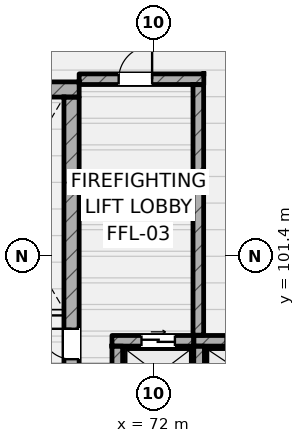
"""IFC4 building model, lengths in metres.
Left out: names, types, materials, properties, quantities, classifications, styles, units other than length and angle.
Written with IfcOpenShell. Run it as: python <this file> out.ifc"""

import sys

from ifc_helpers import new_model, si_unit, direction, frame, frame_2d, origin, place, context, subcontext, project, spatial, rectangle, extrude, element, fill, save


model = new_model("IFC4")
c1 = context("Model", 3, precision=1e-05, world=origin(), true_north=direction((0.0, 1.0)))
c2 = subcontext(c1, "Body", "Model", "MODEL_VIEW")
j1 = project(units=[si_unit("LENGTHUNIT", "METRE"), si_unit("PLANEANGLEUNIT", "RADIAN")], contexts=[c1])
p1 = place(None, origin())
s1 = spatial("IfcSite", under=j1, at=p1, CompositionType="ELEMENT")
p2 = place(p1, origin())
s2 = spatial("IfcBuilding", under=s1, at=p2, CompositionType="ELEMENT")
p3 = place(p2, frame((0.0, 0.0, 51.6)))
s3 = spatial("IfcBuildingStorey", under=s2, at=p3, CompositionType="ELEMENT", Elevation=51.6)
p4 = place(p3, frame((64.4, 106.862, 0.0), z_axis=(0.0, 0.0, 1.0), x_axis=(1.0, 0.0, 0.0)))
e1 = element("IfcWall", 1, at=p4, inside=s3, PredefinedType="SHEAR", context=c2, shape_type="SweptSolid", body=[
    extrude(rectangle(XDim=5.16, YDim=0.5, at=frame_2d((2.58, 0.0))), origin(), (0.0, 0.0, 1.0), 2.8),
])
p5 = place(p3, frame((69.31, 97.5, 0.0), z_axis=(0.0, 0.0, 1.0), x_axis=(0.0, 1.0, 0.0)))
e2 = element("IfcWall", 2, at=p5, inside=s3, PredefinedType="SHEAR", context=c2, shape_type="SweptSolid", body=[
    extrude(rectangle(XDim=9.112, YDim=0.5, at=frame_2d((4.556, 0.0))), origin(), (0.0, 0.0, 1.0), 2.8),
])
p6 = place(p5, frame((0.49, 0.0, 0.0)))
e3 = element("IfcOpeningElement", 3, at=p6, cuts=e2, PredefinedType="OPENING", context=c2, shape_type="SweptSolid", body=[
    extrude(rectangle(XDim=1.0, YDim=2.15, at=frame_2d((0.5, 1.075))), frame((0.0, 0.26, 0.0), z_axis=(0.0, -1.0, 0.0), x_axis=(1.0, 0.0, 0.0)), (0.0, 0.0, 1.0), 0.52),
])
p7 = place(p3, frame((70.64, 98.595, 0.0), z_axis=(0.0, 0.0, 1.0), x_axis=(1.0, 0.0, 0.0)))
e4 = element("IfcWall", 4, at=p7, inside=s3, PredefinedType="SHEAR", context=c2, shape_type="SweptSolid", body=[
    extrude(rectangle(XDim=2.69, YDim=0.35, at=frame_2d((1.345, 0.0))), origin(), (0.0, 0.0, 1.0), 3.6),
])
p8 = place(p7, frame((0.97, 0.0, 0.0)))
e5 = element("IfcOpeningElement", 5, at=p8, cuts=e4, PredefinedType="OPENING", context=c2, shape_type="SweptSolid", body=[
    extrude(rectangle(XDim=1.1, YDim=2.2, at=frame_2d((0.55, 1.1))), frame((0.0, 0.185, 0.0), z_axis=(0.0, -1.0, 0.0), x_axis=(1.0, 0.0, 0.0)), (0.0, 0.0, 1.0), 0.37),
])
p9 = place(p3, frame((70.815, 96.58, 0.0), z_axis=(0.0, 0.0, 1.0), x_axis=(0.0, 1.0, 0.0)))
e6 = element("IfcWall", 6, at=p9, inside=s3, PredefinedType="SHEAR", context=c2, shape_type="SweptSolid", body=[
    extrude(rectangle(XDim=1.84, YDim=0.35, at=frame_2d((0.92, 0.0))), origin(), (0.0, 0.0, 1.0), 3.6),
])
p10 = place(p3, frame((73.33, 98.595, 0.0), z_axis=(0.0, 0.0, 1.0), x_axis=(1.0, 0.0, 0.0)))
e7 = element("IfcWall", 7, at=p10, inside=s3, PredefinedType="SHEAR", context=c2, shape_type="SweptSolid", body=[
    extrude(rectangle(XDim=3.34, YDim=0.35, at=frame_2d((1.67, 0.0))), origin(), (0.0, 0.0, 1.0), 3.6),
])
p11 = place(p10, frame((1.045, 0.0, 0.0)))
e8 = element("IfcOpeningElement", 8, at=p11, cuts=e7, PredefinedType="OPENING", context=c2, shape_type="SweptSolid", body=[
    extrude(rectangle(XDim=1.25, YDim=2.25, at=frame_2d((0.625, 1.125))), frame((0.0, 0.185, 0.0), z_axis=(0.0, -1.0, 0.0), x_axis=(1.0, 0.0, 0.0)), (0.0, 0.0, 1.0), 0.37),
])
p12 = place(p3, frame((73.505, 96.58, 0.0), z_axis=(0.0, 0.0, 1.0), x_axis=(0.0, 1.0, 0.0)))
e9 = element("IfcWall", 9, at=p12, inside=s3, PredefinedType="SHEAR", context=c2, shape_type="SweptSolid", body=[
    extrude(rectangle(XDim=1.84, YDim=0.35, at=frame_2d((0.92, 0.0))), origin(), (0.0, 0.0, 1.0), 3.6),
])
p13 = place(p3, frame((73.48, 98.78, 0.0), z_axis=(0.0, 0.0, 1.0), x_axis=(0.0, 1.0, 0.0)))
e10 = element("IfcWall", 10, at=p13, inside=s3, PredefinedType="SHEAR", context=c2, shape_type="SweptSolid", body=[
    extrude(rectangle(XDim=8.24, YDim=0.35, at=frame_2d((4.12, 0.0))), origin(), (0.0, 0.0, 1.0), 2.6),
])
p14 = place(p3, frame((69.56, 107.2, 0.0), z_axis=(0.0, 0.0, 1.0), x_axis=(1.0, 0.0, 0.0)))
e11 = element("IfcWall", 11, at=p14, inside=s3, PredefinedType="SHEAR", context=c2, shape_type="SweptSolid", body=[
    extrude(rectangle(XDim=4.1, YDim=0.35, at=frame_2d((2.05, 0.0))), origin(), (0.0, 0.0, 1.0), 2.6),
])
p15 = place(p14, frame((1.3, 0.0, 0.0)))
e12 = element("IfcOpeningElement", 12, at=p15, cuts=e11, PredefinedType="OPENING", context=c2, shape_type="SweptSolid", body=[
    extrude(rectangle(XDim=1.1, YDim=2.2, at=frame_2d((0.55, 1.1))), frame((0.0, 0.185, 0.0), z_axis=(0.0, -1.0, 0.0), x_axis=(1.0, 0.0, 0.0)), (0.0, 0.0, 1.0), 0.37),
])
p16 = place(p6, origin())
e13 = element("IfcDoor", 13, at=p16, inside=s3, OperationType="SINGLE_SWING_RIGHT", PredefinedType="DOOR", context=c2, shape_type="SweptSolid", body=[
    extrude(rectangle(XDim=1.0, YDim=2.15, at=frame_2d((0.5, 1.075))), frame((0.0, 0.025, 0.0), z_axis=(0.0, -1.0, 0.0), x_axis=(1.0, 0.0, 0.0)), (0.0, 0.0, 1.0), 0.05),
])
fill(e3, e13)
p17 = place(p8, origin())
e14 = element("IfcDoor", 14, at=p17, inside=s3, OperationType="SLIDING_TO_LEFT", PredefinedType="DOOR", context=c2, shape_type="SweptSolid", body=[
    extrude(rectangle(XDim=1.1, YDim=2.2, at=frame_2d((0.55, 1.1))), frame((0.0, 0.025, 0.0), z_axis=(0.0, -1.0, 0.0), x_axis=(1.0, 0.0, 0.0)), (0.0, 0.0, 1.0), 0.05),
])
fill(e5, e14)
p18 = place(p15, origin())
e15 = element("IfcDoor", 15, at=p18, inside=s3, OperationType="SINGLE_SWING_RIGHT", PredefinedType="DOOR", context=c2, shape_type="SweptSolid", body=[
    extrude(rectangle(XDim=1.1, YDim=2.2, at=frame_2d((0.55, 1.1))), frame((0.0, 0.025, 0.0), z_axis=(0.0, -1.0, 0.0), x_axis=(1.0, 0.0, 0.0)), (0.0, 0.0, 1.0), 0.05),
])
fill(e12, e15)
save(model, sys.argv[1])
